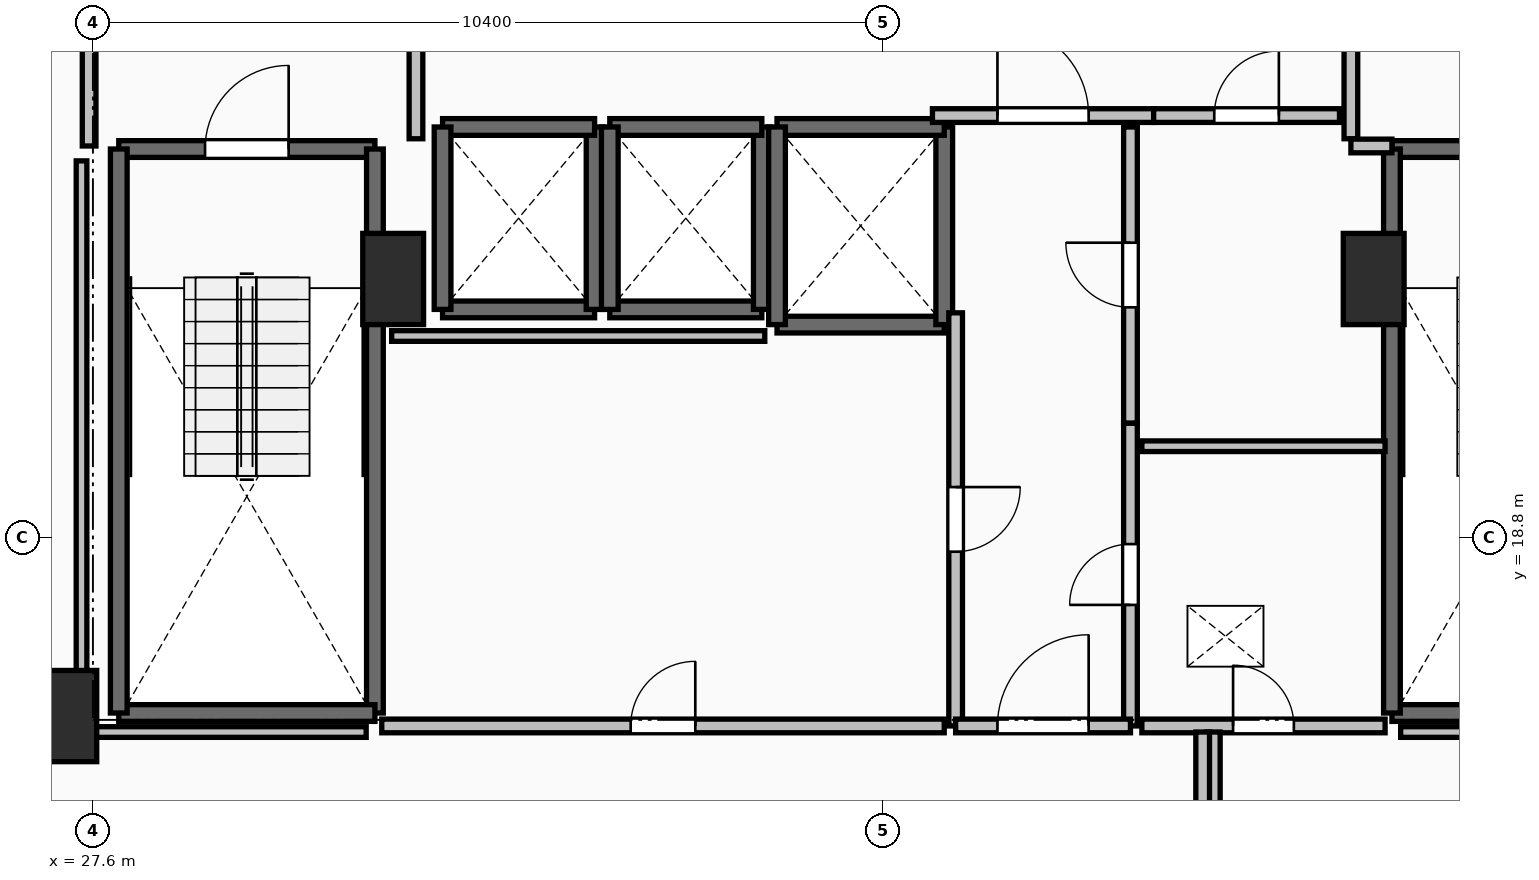
"""IFC4 building model, lengths in metres.
Left out: names, types, materials, properties, quantities, classifications, styles, units other than length and angle.
Written with IfcOpenShell. Run it as: python <this file> out.ifc"""

import sys

from ifc_helpers import new_model, si_unit, direction, frame, frame_2d, origin, origin_2d, place, context, subcontext, project, spatial, rectangle, extrude, element, fill, save


model = new_model("IFC4")
c1 = context("Model", 3, precision=1e-05, world=origin(), true_north=direction((0.0, 1.0)))
c2 = subcontext(c1, "Body", "Model", "MODEL_VIEW")
j1 = project(units=[si_unit("LENGTHUNIT", "METRE"), si_unit("PLANEANGLEUNIT", "RADIAN")], contexts=[c1])
p1 = place(None, origin())
s1 = spatial("IfcSite", under=j1, at=p1, CompositionType="ELEMENT")
p2 = place(p1, origin())
s2 = spatial("IfcBuilding", under=s1, at=p2, CompositionType="ELEMENT")
p3 = place(p2, frame((0.0, 0.0, 34.5)))
s3 = spatial("IfcBuildingStorey", under=s2, at=p3, CompositionType="ELEMENT", Elevation=34.5)
for number, where, z_axis, x_axis in (
    (1, (27.25, 16.45, 0.0), (0.0, 0.0, 1.0), (1.0, 0.0, 0.0)),
    (2, (31.55, 22.2, 0.0), (0.0, 0.0, 1.0), (1.0, 0.0, 0.0)),
    (3, (44.45, 22.2, 0.0), (0.0, 0.0, 1.0), (1.0, 0.0, 0.0)),
):
    element("IfcColumn", number, at=place(p3, frame(where, z_axis=z_axis, x_axis=x_axis)), inside=s3, PredefinedType="PILASTER", context=c2, shape_type="SweptSolid", body=[
        extrude(rectangle(XDim=0.8, YDim=1.2, at=origin_2d()), origin(), (0.0, 0.0, 1.0), 3.5),
    ])
p4 = place(p3, frame((27.94, 23.91, 0.0), z_axis=(0.0, 0.0, 1.0), x_axis=(1.0, 0.0, 0.0)))
e4 = element("IfcWall", 4, at=p4, inside=s3, PredefinedType="SOLIDWALL", context=c2, shape_type="SweptSolid", body=[
    extrude(rectangle(XDim=3.37, YDim=0.22, at=frame_2d((1.685, 0.0))), origin(), (0.0, 0.0, 1.0), 3.24),
])
p5 = place(p4, frame((1.135, 0.0, 0.0)))
e5 = element("IfcOpeningElement", 5, at=p5, cuts=e4, PredefinedType="OPENING", context=c2, shape_type="SweptSolid", body=[
    extrude(rectangle(XDim=1.1, YDim=2.15, at=frame_2d((0.55, 1.075))), frame((0.0, 0.125, 0.0), z_axis=(0.0, -1.0, 0.0), x_axis=(1.0, 0.0, 0.0)), (0.0, 0.0, 1.0), 0.25),
])
p6 = place(p3, frame((31.31, 23.91, 0.0), z_axis=(0.0, 0.0, 1.0), x_axis=(0.0, -1.0, 0.0)))
e6 = element("IfcWall", 6, at=p6, inside=s3, PredefinedType="SOLIDWALL", context=c2, shape_type="SweptSolid", body=[
    extrude(rectangle(XDim=7.42, YDim=0.22, at=frame_2d((3.71, 0.0))), origin(), (0.0, 0.0, 1.0), 3.24),
])
p7 = place(p3, frame((31.31, 16.49, 0.0), z_axis=(0.0, 0.0, 1.0), x_axis=(-1.0, 0.0, 0.0)))
e7 = element("IfcWall", 7, at=p7, inside=s3, PredefinedType="SOLIDWALL", context=c2, shape_type="SweptSolid", body=[
    extrude(rectangle(XDim=3.37, YDim=0.22, at=frame_2d((1.685, 0.0))), origin(), (0.0, 0.0, 1.0), 3.24),
])
p8 = place(p3, frame((27.94, 16.49, 0.0), z_axis=(0.0, 0.0, 1.0), x_axis=(0.0, 1.0, 0.0)))
e8 = element("IfcWall", 8, at=p8, inside=s3, PredefinedType="SOLIDWALL", context=c2, shape_type="SweptSolid", body=[
    extrude(rectangle(XDim=7.42, YDim=0.22, at=frame_2d((3.71, 0.0))), origin(), (0.0, 0.0, 1.0), 3.24),
])
p9 = place(p3, frame((44.69, 23.91, 0.0), z_axis=(0.0, 0.0, 1.0), x_axis=(1.0, 0.0, 0.0)))
e9 = element("IfcWall", 9, at=p9, inside=s3, PredefinedType="SOLIDWALL", context=c2, shape_type="SweptSolid", body=[
    extrude(rectangle(XDim=3.37, YDim=0.22, at=frame_2d((1.685, 0.0))), origin(), (0.0, 0.0, 1.0), 3.24),
])
p10 = place(p9, frame((1.135, 0.0, 0.0)))
e10 = element("IfcOpeningElement", 10, at=p10, cuts=e9, PredefinedType="OPENING", context=c2, shape_type="SweptSolid", body=[
    extrude(rectangle(XDim=1.1, YDim=2.15, at=frame_2d((0.55, 1.075))), frame((0.0, 0.125, 0.0), z_axis=(0.0, -1.0, 0.0), x_axis=(1.0, 0.0, 0.0)), (0.0, 0.0, 1.0), 0.25),
])
p11 = place(p3, frame((48.06, 16.49, 0.0), z_axis=(0.0, 0.0, 1.0), x_axis=(-1.0, 0.0, 0.0)))
e11 = element("IfcWall", 11, at=p11, inside=s3, PredefinedType="SOLIDWALL", context=c2, shape_type="SweptSolid", body=[
    extrude(rectangle(XDim=3.37, YDim=0.22, at=frame_2d((1.685, 0.0))), origin(), (0.0, 0.0, 1.0), 3.24),
])
p12 = place(p3, frame((44.69, 16.49, 0.0), z_axis=(0.0, 0.0, 1.0), x_axis=(0.0, 1.0, 0.0)))
e12 = element("IfcWall", 12, at=p12, inside=s3, PredefinedType="SOLIDWALL", context=c2, shape_type="SweptSolid", body=[
    extrude(rectangle(XDim=7.42, YDim=0.22, at=frame_2d((3.71, 0.0))), origin(), (0.0, 0.0, 1.0), 3.24),
])
p13 = place(p3, frame((32.2, 21.8, 0.0), z_axis=(0.0, 0.0, 1.0), x_axis=(1.0, 0.0, 0.0)))
e13 = element("IfcWall", 13, at=p13, inside=s3, PredefinedType="SOLIDWALL", context=c2, shape_type="SweptSolid", body=[
    extrude(rectangle(XDim=2.0, YDim=0.22, at=frame_2d((1.0, 0.0))), origin(), (0.0, 0.0, 1.0), 3.24),
])
p14 = place(p3, frame((34.2, 21.8, 0.0), z_axis=(0.0, 0.0, 1.0), x_axis=(0.0, 1.0, 0.0)))
e14 = element("IfcWall", 14, at=p14, inside=s3, PredefinedType="SOLIDWALL", context=c2, shape_type="SweptSolid", body=[
    extrude(rectangle(XDim=2.4, YDim=0.22, at=frame_2d((1.2, 0.0))), origin(), (0.0, 0.0, 1.0), 3.24),
])
p15 = place(p3, frame((34.2, 24.2, 0.0), z_axis=(0.0, 0.0, 1.0), x_axis=(-1.0, 0.0, 0.0)))
e15 = element("IfcWall", 15, at=p15, inside=s3, PredefinedType="SOLIDWALL", context=c2, shape_type="SweptSolid", body=[
    extrude(rectangle(XDim=2.0, YDim=0.22, at=frame_2d((1.0, 0.0))), origin(), (0.0, 0.0, 1.0), 3.24),
])
p16 = place(p3, frame((32.2, 24.2, 0.0), z_axis=(0.0, 0.0, 1.0), x_axis=(0.0, -1.0, 0.0)))
e16 = element("IfcWall", 16, at=p16, inside=s3, PredefinedType="SOLIDWALL", context=c2, shape_type="SweptSolid", body=[
    extrude(rectangle(XDim=2.4, YDim=0.22, at=frame_2d((1.2, 0.0))), origin(), (0.0, 0.0, 1.0), 3.24),
])
p17 = place(p3, frame((34.4, 21.8, 0.0), z_axis=(0.0, 0.0, 1.0), x_axis=(1.0, 0.0, 0.0)))
e17 = element("IfcWall", 17, at=p17, inside=s3, PredefinedType="SOLIDWALL", context=c2, shape_type="SweptSolid", body=[
    extrude(rectangle(XDim=2.0, YDim=0.22, at=frame_2d((1.0, 0.0))), origin(), (0.0, 0.0, 1.0), 3.24),
])
p18 = place(p3, frame((36.4, 21.8, 0.0), z_axis=(0.0, 0.0, 1.0), x_axis=(0.0, 1.0, 0.0)))
e18 = element("IfcWall", 18, at=p18, inside=s3, PredefinedType="SOLIDWALL", context=c2, shape_type="SweptSolid", body=[
    extrude(rectangle(XDim=2.4, YDim=0.22, at=frame_2d((1.2, 0.0))), origin(), (0.0, 0.0, 1.0), 3.24),
])
p19 = place(p3, frame((36.4, 24.2, 0.0), z_axis=(0.0, 0.0, 1.0), x_axis=(-1.0, 0.0, 0.0)))
e19 = element("IfcWall", 19, at=p19, inside=s3, PredefinedType="SOLIDWALL", context=c2, shape_type="SweptSolid", body=[
    extrude(rectangle(XDim=2.0, YDim=0.22, at=frame_2d((1.0, 0.0))), origin(), (0.0, 0.0, 1.0), 3.24),
])
p20 = place(p3, frame((34.4, 24.2, 0.0), z_axis=(0.0, 0.0, 1.0), x_axis=(0.0, -1.0, 0.0)))
e20 = element("IfcWall", 20, at=p20, inside=s3, PredefinedType="SOLIDWALL", context=c2, shape_type="SweptSolid", body=[
    extrude(rectangle(XDim=2.4, YDim=0.22, at=frame_2d((1.2, 0.0))), origin(), (0.0, 0.0, 1.0), 3.24),
])
p21 = place(p3, frame((36.6, 21.6, 0.0), z_axis=(0.0, 0.0, 1.0), x_axis=(1.0, 0.0, 0.0)))
e21 = element("IfcWall", 21, at=p21, inside=s3, PredefinedType="SOLIDWALL", context=c2, shape_type="SweptSolid", body=[
    extrude(rectangle(XDim=2.2, YDim=0.22, at=frame_2d((1.1, 0.0))), origin(), (0.0, 0.0, 1.0), 3.24),
])
p22 = place(p3, frame((38.8, 21.6, 0.0), z_axis=(0.0, 0.0, 1.0), x_axis=(0.0, 1.0, 0.0)))
e22 = element("IfcWall", 22, at=p22, inside=s3, PredefinedType="SOLIDWALL", context=c2, shape_type="SweptSolid", body=[
    extrude(rectangle(XDim=2.6, YDim=0.22, at=frame_2d((1.3, 0.0))), origin(), (0.0, 0.0, 1.0), 3.24),
])
p23 = place(p3, frame((38.8, 24.2, 0.0), z_axis=(0.0, 0.0, 1.0), x_axis=(-1.0, 0.0, 0.0)))
e23 = element("IfcWall", 23, at=p23, inside=s3, PredefinedType="SOLIDWALL", context=c2, shape_type="SweptSolid", body=[
    extrude(rectangle(XDim=2.2, YDim=0.22, at=frame_2d((1.1, 0.0))), origin(), (0.0, 0.0, 1.0), 3.24),
])
p24 = place(p3, frame((36.6, 24.2, 0.0), z_axis=(0.0, 0.0, 1.0), x_axis=(0.0, -1.0, 0.0)))
e24 = element("IfcWall", 24, at=p24, inside=s3, PredefinedType="SOLIDWALL", context=c2, shape_type="SweptSolid", body=[
    extrude(rectangle(XDim=2.6, YDim=0.22, at=frame_2d((1.3, 0.0))), origin(), (0.0, 0.0, 1.0), 3.24),
])
p25 = place(p3, frame((31.85, 24.045, 0.0), z_axis=(0.0, 0.0, 1.0), x_axis=(0.0, 1.0, 0.0)))
e25 = element("IfcWall", 25, at=p25, inside=s3, PredefinedType="PARTITIONING", context=c2, shape_type="SweptSolid", body=[
    extrude(rectangle(XDim=3.91, YDim=0.18, at=frame_2d((1.955, 0.0))), origin(), (0.0, 0.0, 1.0), 3.24),
])
p26 = place(p25, frame((1.355, 0.0, 0.0)))
e26 = element("IfcOpeningElement", 26, at=p26, cuts=e25, PredefinedType="OPENING", context=c2, shape_type="SweptSolid", body=[
    extrude(rectangle(XDim=1.2, YDim=2.15, at=frame_2d((0.6, 1.075))), frame((0.0, 0.105, 0.0), z_axis=(0.0, -1.0, 0.0), x_axis=(1.0, 0.0, 0.0)), (0.0, 0.0, 1.0), 0.21),
])
p27 = place(p3, frame((27.55, 28.0, 0.0), z_axis=(0.0, 0.0, 1.0), x_axis=(0.0, -1.0, 0.0)))
e27 = element("IfcWall", 27, at=p27, inside=s3, PredefinedType="PARTITIONING", context=c2, shape_type="SweptSolid", body=[
    extrude(rectangle(XDim=4.05, YDim=0.18, at=frame_2d((2.025, 0.0))), origin(), (0.0, 0.0, 1.0), 3.24),
])
p28 = place(p27, frame((1.425, 0.0, 0.0)))
e28 = element("IfcOpeningElement", 28, at=p28, cuts=e27, PredefinedType="OPENING", context=c2, shape_type="SweptSolid", body=[
    extrude(rectangle(XDim=1.2, YDim=2.15, at=frame_2d((0.6, 1.075))), frame((0.0, 0.105, 0.0), z_axis=(0.0, -1.0, 0.0), x_axis=(1.0, 0.0, 0.0)), (0.0, 0.0, 1.0), 0.21),
])
p29 = place(p3, frame((44.15, 27.955, 0.0), z_axis=(0.0, 0.0, 1.0), x_axis=(0.0, -1.0, 0.0)))
e29 = element("IfcWall", 29, at=p29, inside=s3, PredefinedType="PARTITIONING", context=c2, shape_type="SweptSolid", body=[
    extrude(rectangle(XDim=3.91, YDim=0.18, at=frame_2d((1.955, 0.0))), origin(), (0.0, 0.0, 1.0), 3.24),
])
p30 = place(p29, frame((1.355, 0.0, 0.0)))
e30 = element("IfcOpeningElement", 30, at=p30, cuts=e29, PredefinedType="OPENING", context=c2, shape_type="SweptSolid", body=[
    extrude(rectangle(XDim=1.2, YDim=2.15, at=frame_2d((0.6, 1.075))), frame((0.0, 0.105, 0.0), z_axis=(0.0, -1.0, 0.0), x_axis=(1.0, 0.0, 0.0)), (0.0, 0.0, 1.0), 0.21),
])
p31 = place(p3, frame((44.15, 23.95, 0.0), z_axis=(0.0, 0.0, 1.0), x_axis=(1.0, 0.0, 0.0)))
e31 = element("IfcWall", 31, at=p31, inside=s3, PredefinedType="PARTITIONING", context=c2, shape_type="SweptSolid", body=[
    extrude(rectangle(XDim=0.54, YDim=0.18, at=frame_2d((0.27, 0.0))), origin(), (0.0, 0.0, 1.0), 3.24),
])
p32 = place(p3, frame((38.645, 24.35, 0.0), z_axis=(0.0, 0.0, 1.0), x_axis=(1.0, 0.0, 0.0)))
e32 = element("IfcWall", 32, at=p32, inside=s3, PredefinedType="PARTITIONING", context=c2, shape_type="SweptSolid", body=[
    extrude(rectangle(XDim=2.91, YDim=0.18, at=frame_2d((1.455, 0.0))), origin(), (0.0, 0.0, 1.0), 3.24),
])
p33 = place(p32, frame((0.855, 0.0, 0.0)))
e33 = element("IfcOpeningElement", 33, at=p33, cuts=e32, PredefinedType="OPENING", context=c2, shape_type="SweptSolid", body=[
    extrude(rectangle(XDim=1.2, YDim=2.15, at=frame_2d((0.6, 1.075))), frame((0.0, 0.105, 0.0), z_axis=(0.0, -1.0, 0.0), x_axis=(1.0, 0.0, 0.0)), (0.0, 0.0, 1.0), 0.21),
])
p34 = place(p3, frame((41.555, 24.35, 0.0), z_axis=(0.0, 0.0, 1.0), x_axis=(1.0, 0.0, 0.0)))
e34 = element("IfcWall", 34, at=p34, inside=s3, PredefinedType="PARTITIONING", context=c2, shape_type="SweptSolid", body=[
    extrude(rectangle(XDim=2.445, YDim=0.18, at=frame_2d((1.223, 0.0))), origin(), (0.0, 0.0, 1.0), 3.24),
])
p35 = place(p34, frame((0.798, 0.0, 0.0)))
e35 = element("IfcOpeningElement", 35, at=p35, cuts=e34, PredefinedType="OPENING", context=c2, shape_type="SweptSolid", body=[
    extrude(rectangle(XDim=0.85, YDim=2.1, at=frame_2d((0.425, 1.05))), frame((0.0, 0.105, 0.0), z_axis=(0.0, -1.0, 0.0), x_axis=(1.0, 0.0, 0.0)), (0.0, 0.0, 1.0), 0.21),
])
p36 = place(p3, frame((41.25, 16.32, 0.0), z_axis=(0.0, 0.0, 1.0), x_axis=(0.0, 1.0, 0.0)))
e36 = element("IfcWall", 36, at=p36, inside=s3, PredefinedType="PARTITIONING", context=c2, shape_type="SweptSolid", body=[
    extrude(rectangle(XDim=3.985, YDim=0.18, at=frame_2d((1.992, 0.0))), origin(), (0.0, 0.0, 1.0), 3.24),
])
p37 = place(p36, frame((1.593, 0.0, 0.0)))
e37 = element("IfcOpeningElement", 37, at=p37, cuts=e36, PredefinedType="OPENING", context=c2, shape_type="SweptSolid", body=[
    extrude(rectangle(XDim=0.8, YDim=2.05, at=frame_2d((0.4, 1.025))), frame((0.0, 0.105, 0.0), z_axis=(0.0, -1.0, 0.0), x_axis=(1.0, 0.0, 0.0)), (0.0, 0.0, 1.0), 0.21),
])
p38 = place(p3, frame((41.25, 20.305, 0.0), z_axis=(0.0, 0.0, 1.0), x_axis=(0.0, 1.0, 0.0)))
e38 = element("IfcWall", 38, at=p38, inside=s3, PredefinedType="PARTITIONING", context=c2, shape_type="SweptSolid", body=[
    extrude(rectangle(XDim=3.895, YDim=0.18, at=frame_2d((1.948, 0.0))), origin(), (0.0, 0.0, 1.0), 3.24),
])
p39 = place(p38, frame((1.522, 0.0, 0.0)))
e39 = element("IfcOpeningElement", 39, at=p39, cuts=e38, PredefinedType="OPENING", context=c2, shape_type="SweptSolid", body=[
    extrude(rectangle(XDim=0.85, YDim=2.1, at=frame_2d((0.425, 1.05))), frame((0.0, 0.105, 0.0), z_axis=(0.0, -1.0, 0.0), x_axis=(1.0, 0.0, 0.0)), (0.0, 0.0, 1.0), 0.21),
])
p40 = place(p3, frame((38.95, 21.755, 0.0), z_axis=(0.0, 0.0, 1.0), x_axis=(0.0, -1.0, 0.0)))
e40 = element("IfcWall", 40, at=p40, inside=s3, PredefinedType="PARTITIONING", context=c2, shape_type="SweptSolid", body=[
    extrude(rectangle(XDim=5.435, YDim=0.18, at=frame_2d((2.717, 0.0))), origin(), (0.0, 0.0, 1.0), 3.24),
])
p41 = place(p40, frame((2.292, 0.0, 0.0)))
e41 = element("IfcOpeningElement", 41, at=p41, cuts=e40, PredefinedType="OPENING", context=c2, shape_type="SweptSolid", body=[
    extrude(rectangle(XDim=0.85, YDim=2.1, at=frame_2d((0.425, 1.05))), frame((0.0, 0.105, 0.0), z_axis=(0.0, -1.0, 0.0), x_axis=(1.0, 0.0, 0.0)), (0.0, 0.0, 1.0), 0.21),
])
p42 = place(p3, frame((38.95, 16.32, 0.0), z_axis=(0.0, 0.0, 1.0), x_axis=(1.0, 0.0, 0.0)))
e42 = element("IfcWall", 42, at=p42, inside=s3, PredefinedType="PARTITIONING", context=c2, shape_type="SweptSolid", body=[
    extrude(rectangle(XDim=2.3, YDim=0.18, at=frame_2d((1.15, 0.0))), origin(), (0.0, 0.0, 1.0), 3.24),
])
p43 = place(p42, frame((0.55, 0.0, 0.0)))
e43 = element("IfcOpeningElement", 43, at=p43, cuts=e42, PredefinedType="OPENING", context=c2, shape_type="SweptSolid", body=[
    extrude(rectangle(XDim=1.2, YDim=2.15, at=frame_2d((0.6, 1.075))), frame((0.0, 0.105, 0.0), z_axis=(0.0, -1.0, 0.0), x_axis=(1.0, 0.0, 0.0)), (0.0, 0.0, 1.0), 0.21),
])
p44 = place(p3, frame((44.6, 20.0, 0.0), z_axis=(0.0, 0.0, 1.0), x_axis=(-1.0, 0.0, 0.0)))
e44 = element("IfcWall", 44, at=p44, inside=s3, PredefinedType="PARTITIONING", context=c2, shape_type="SweptSolid", body=[
    extrude(rectangle(XDim=3.2, YDim=0.14, at=frame_2d((1.6, 0.0))), origin(), (0.0, 0.0, 1.0), 3.24),
])
p45 = place(p3, frame((41.4, 16.32, 0.0), z_axis=(0.0, 0.0, 1.0), x_axis=(1.0, 0.0, 0.0)))
e45 = element("IfcWall", 45, at=p45, inside=s3, PredefinedType="PARTITIONING", context=c2, shape_type="SweptSolid", body=[
    extrude(rectangle(XDim=3.2, YDim=0.18, at=frame_2d((1.6, 0.0))), origin(), (0.0, 0.0, 1.0), 3.24),
])
p46 = place(p45, frame((1.2, 0.0, 0.0)))
e46 = element("IfcOpeningElement", 46, at=p46, cuts=e45, PredefinedType="OPENING", context=c2, shape_type="SweptSolid", body=[
    extrude(rectangle(XDim=0.8, YDim=2.05, at=frame_2d((0.4, 1.025))), frame((0.0, 0.105, 0.0), z_axis=(0.0, -1.0, 0.0), x_axis=(1.0, 0.0, 0.0)), (0.0, 0.0, 1.0), 0.21),
])
p47 = place(p3, frame((31.4, 16.32, 0.0), z_axis=(0.0, 0.0, 1.0), x_axis=(1.0, 0.0, 0.0)))
e47 = element("IfcWall", 47, at=p47, inside=s3, PredefinedType="PARTITIONING", context=c2, shape_type="SweptSolid", body=[
    extrude(rectangle(XDim=7.4, YDim=0.18, at=frame_2d((3.7, 0.0))), origin(), (0.0, 0.0, 1.0), 3.24),
])
p48 = place(p47, frame((3.275, 0.0, 0.0)))
e48 = element("IfcOpeningElement", 48, at=p48, cuts=e47, PredefinedType="OPENING", context=c2, shape_type="SweptSolid", body=[
    extrude(rectangle(XDim=0.85, YDim=2.1, at=frame_2d((0.425, 1.05))), frame((0.0, 0.105, 0.0), z_axis=(0.0, -1.0, 0.0), x_axis=(1.0, 0.0, 0.0)), (0.0, 0.0, 1.0), 0.21),
])
for number, where, z_axis, x_axis in (
    (49, (42.34, 16.24, 0.0), (0.0, 0.0, 1.0), (0.0, -1.0, 0.0)),
    (50, (42.2, 14.1, 0.0), (0.0, 0.0, 1.0), (0.0, 1.0, 0.0)),
):
    element("IfcWall", number, at=place(p3, frame(where, z_axis=z_axis, x_axis=x_axis)), inside=s3, PredefinedType="PARTITIONING", context=c2, shape_type="SweptSolid", body=[
        extrude(rectangle(XDim=2.14, YDim=0.18, at=frame_2d((1.07, 0.0))), origin(), (0.0, 0.0, 1.0), 3.24),
    ])
p49 = place(p3, frame((36.439, 21.45, 0.0), z_axis=(0.0, 0.0, 1.0), x_axis=(-1.0, 0.0, 0.0)))
e51 = element("IfcWall", 51, at=p49, inside=s3, PredefinedType="PARTITIONING", context=c2, shape_type="SweptSolid", body=[
    extrude(rectangle(XDim=4.909, YDim=0.14, at=frame_2d((2.455, 0.0))), origin(), (0.0, 0.0, 1.0), 3.24),
])
for number, where, z_axis, x_axis in (
    (52, (48.55, 16.24, 0.0), (0.0, 0.0, 1.0), (-1.0, 0.0, 0.0)),
    (53, (31.195, 16.24, 0.0), (0.0, 0.0, 1.0), (-1.0, 0.0, 0.0)),
):
    element("IfcWall", number, at=place(p3, frame(where, z_axis=z_axis, x_axis=x_axis)), inside=s3, PredefinedType="PARTITIONING", context=c2, shape_type="SweptSolid", body=[
        extrude(rectangle(XDim=3.745, YDim=0.14, at=frame_2d((1.873, 0.0))), origin(), (0.0, 0.0, 1.0), 2.432),
    ])
p50 = place(p3, frame((27.45, 16.24, 0.0), z_axis=(0.0, 0.0, 1.0), x_axis=(0.0, 1.0, 0.0)))
e54 = element("IfcWall", 54, at=p50, inside=s3, PredefinedType="PARTITIONING", context=c2, shape_type="SweptSolid", body=[
    extrude(rectangle(XDim=7.514, YDim=0.14, at=frame_2d((3.757, 0.0))), origin(), (0.0, 0.0, 1.0), 2.432),
])
p51 = place(p5, origin())
e55 = element("IfcDoor", 55, at=p51, inside=s3, OperationType="SINGLE_SWING_RIGHT", PredefinedType="DOOR", context=c2, shape_type="SweptSolid", body=[
    extrude(rectangle(XDim=1.1, YDim=2.15, at=frame_2d((0.55, 1.075))), frame((0.0, 0.025, 0.0), z_axis=(0.0, -1.0, 0.0), x_axis=(1.0, 0.0, 0.0)), (0.0, 0.0, 1.0), 0.05),
])
fill(e5, e55)
p52 = place(p33, origin())
e56 = element("IfcDoor", 56, at=p52, inside=s3, OperationType="SINGLE_SWING_LEFT", PredefinedType="DOOR", context=c2, shape_type="SweptSolid", body=[
    extrude(rectangle(XDim=1.2, YDim=2.15, at=frame_2d((0.6, 1.075))), frame((0.0, 0.025, 0.0), z_axis=(0.0, -1.0, 0.0), x_axis=(1.0, 0.0, 0.0)), (0.0, 0.0, 1.0), 0.05),
])
fill(e33, e56)
p53 = place(p35, origin())
e57 = element("IfcDoor", 57, at=p53, inside=s3, OperationType="SINGLE_SWING_RIGHT", PredefinedType="DOOR", context=c2, shape_type="SweptSolid", body=[
    extrude(rectangle(XDim=0.85, YDim=2.1, at=frame_2d((0.425, 1.05))), frame((0.0, 0.025, 0.0), z_axis=(0.0, -1.0, 0.0), x_axis=(1.0, 0.0, 0.0)), (0.0, 0.0, 1.0), 0.05),
])
fill(e35, e57)
p54 = place(p37, origin())
e58 = element("IfcDoor", 58, at=p54, inside=s3, OperationType="SINGLE_SWING_LEFT", PredefinedType="DOOR", context=c2, shape_type="SweptSolid", body=[
    extrude(rectangle(XDim=0.8, YDim=2.05, at=frame_2d((0.4, 1.025))), frame((0.0, 0.025, 0.0), z_axis=(0.0, -1.0, 0.0), x_axis=(1.0, 0.0, 0.0)), (0.0, 0.0, 1.0), 0.05),
])
fill(e37, e58)
p55 = place(p39, origin())
e59 = element("IfcDoor", 59, at=p55, inside=s3, OperationType="SINGLE_SWING_RIGHT", PredefinedType="DOOR", context=c2, shape_type="SweptSolid", body=[
    extrude(rectangle(XDim=0.85, YDim=2.1, at=frame_2d((0.425, 1.05))), frame((0.0, 0.025, 0.0), z_axis=(0.0, -1.0, 0.0), x_axis=(1.0, 0.0, 0.0)), (0.0, 0.0, 1.0), 0.05),
])
fill(e39, e59)
p56 = place(p41, origin())
e60 = element("IfcDoor", 60, at=p56, inside=s3, OperationType="SINGLE_SWING_LEFT", PredefinedType="DOOR", context=c2, shape_type="SweptSolid", body=[
    extrude(rectangle(XDim=0.85, YDim=2.1, at=frame_2d((0.425, 1.05))), frame((0.0, 0.025, 0.0), z_axis=(0.0, -1.0, 0.0), x_axis=(1.0, 0.0, 0.0)), (0.0, 0.0, 1.0), 0.05),
])
fill(e41, e60)
p57 = place(p43, origin())
e61 = element("IfcDoor", 61, at=p57, inside=s3, OperationType="SINGLE_SWING_RIGHT", PredefinedType="DOOR", context=c2, shape_type="SweptSolid", body=[
    extrude(rectangle(XDim=1.2, YDim=2.15, at=frame_2d((0.6, 1.075))), frame((0.0, 0.025, 0.0), z_axis=(0.0, -1.0, 0.0), x_axis=(1.0, 0.0, 0.0)), (0.0, 0.0, 1.0), 0.05),
])
fill(e43, e61)
p58 = place(p46, origin())
e62 = element("IfcDoor", 62, at=p58, inside=s3, OperationType="SINGLE_SWING_LEFT", PredefinedType="DOOR", context=c2, shape_type="SweptSolid", body=[
    extrude(rectangle(XDim=0.8, YDim=2.05, at=frame_2d((0.4, 1.025))), frame((0.0, 0.025, 0.0), z_axis=(0.0, -1.0, 0.0), x_axis=(1.0, 0.0, 0.0)), (0.0, 0.0, 1.0), 0.05),
])
fill(e46, e62)
p59 = place(p48, origin())
e63 = element("IfcDoor", 63, at=p59, inside=s3, OperationType="SINGLE_SWING_RIGHT", PredefinedType="DOOR", context=c2, shape_type="SweptSolid", body=[
    extrude(rectangle(XDim=0.85, YDim=2.1, at=frame_2d((0.425, 1.05))), frame((0.0, 0.025, 0.0), z_axis=(0.0, -1.0, 0.0), x_axis=(1.0, 0.0, 0.0)), (0.0, 0.0, 1.0), 0.05),
])
fill(e48, e63)
save(model, sys.argv[1])
